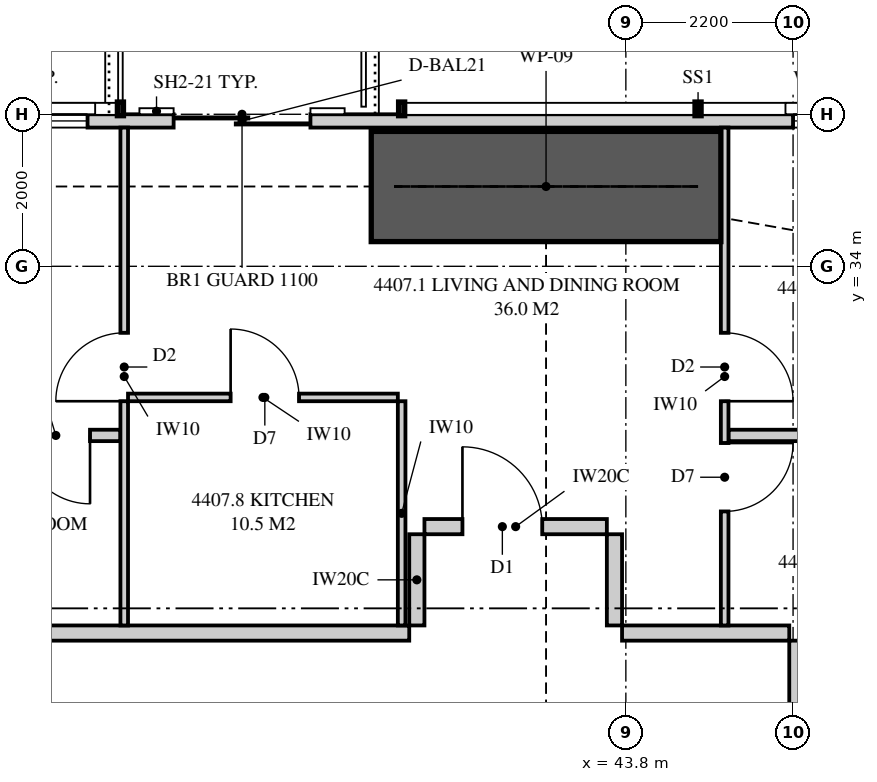
"""IFC4 building model, lengths in metres.
Left out: names, types, materials, properties, quantities, classifications, styles, units other than length and angle.
Written with IfcOpenShell. Run it as: python <this file> out.ifc"""

import sys

from ifc_helpers import new_model, si_unit, direction, frame, frame_2d, origin, place, context, subcontext, project, spatial, polyline, rectangle, outline, extrude, element, fill, save


model = new_model("IFC4")
c1 = context("Model", 3, precision=1e-05, world=origin(), true_north=direction((0.0, 1.0)))
c2 = subcontext(c1, "Body", "Model", "MODEL_VIEW")
j1 = project(units=[si_unit("LENGTHUNIT", "METRE"), si_unit("PLANEANGLEUNIT", "RADIAN")], contexts=[c1])
p1 = place(None, origin())
s1 = spatial("IfcSite", under=j1, at=p1, CompositionType="ELEMENT")
p2 = place(p1, origin())
s2 = spatial("IfcBuilding", under=s1, at=p2, CompositionType="ELEMENT")
p3 = place(p2, frame((0.0, 0.0, 164.4)))
s3 = spatial("IfcBuildingStorey", under=s2, at=p3, CompositionType="ELEMENT", Elevation=164.4)
p4 = place(p3, frame((49.949, 35.913, 0.0), z_axis=(0.0, 0.0, 1.0), x_axis=(-1.0, 0.0, 0.0)))
e1 = element("IfcWall", 1, at=p4, inside=s3, PredefinedType="SOLIDWALL", context=c2, shape_type="SweptSolid", body=[
    extrude(outline(polyline([(0.0, 0.0), (34.897, 0.0), (34.897, 3.11), (27.91, 3.11), (27.91, 2.15), (27.836, 2.15), (27.836, 3.11), (27.699, 3.11), (27.699, 2.15), (7.199, 2.15), (7.199, 3.11), (7.062, 3.11), (7.062, 2.15), (6.987, 2.15), (6.987, 3.11), (0.0, 3.11), (0.0, 0.0)])), frame((0.0, 0.087, 0.0), z_axis=(0.0, -1.0, 0.0), x_axis=(1.0, 0.0, 0.0)), (0.0, 0.0, 1.0), 0.175),
])
p5 = place(p4, frame((2.149, 0.0, 0.4)))
e2 = element("IfcOpeningElement", 2, at=p5, cuts=e1, PredefinedType="OPENING", context=c2, shape_type="SweptSolid", body=[
    extrude(rectangle(XDim=1.8, YDim=1.7, at=frame_2d((0.9, 0.85))), frame((0.0, 0.097, 0.0), z_axis=(0.0, -1.0, 0.0), x_axis=(1.0, 0.0, 0.0)), (0.0, 0.0, 1.0), 0.195),
])
p6 = place(p4, frame((10.299, 0.0, 0.0)))
e3 = element("IfcOpeningElement", 3, at=p6, cuts=e1, PredefinedType="OPENING", context=c2, shape_type="SweptSolid", body=[
    extrude(rectangle(XDim=1.8, YDim=2.1, at=frame_2d((0.9, 1.05))), frame((0.0, 0.097, 0.0), z_axis=(0.0, -1.0, 0.0), x_axis=(1.0, 0.0, 0.0)), (0.0, 0.0, 1.0), 0.195),
])
p7 = place(p4, frame((13.231, 0.0, 0.4)))
e4 = element("IfcOpeningElement", 4, at=p7, cuts=e1, PredefinedType="OPENING", context=c2, shape_type="SweptSolid", body=[
    extrude(rectangle(XDim=1.8, YDim=1.7, at=frame_2d((0.9, 0.85))), frame((0.0, 0.097, 0.0), z_axis=(0.0, -1.0, 0.0), x_axis=(1.0, 0.0, 0.0)), (0.0, 0.0, 1.0), 0.195),
])
p8 = place(p4, frame((22.699, 0.0, 0.0)))
e5 = element("IfcOpeningElement", 5, at=p8, cuts=e1, PredefinedType="OPENING", context=c2, shape_type="SweptSolid", body=[
    extrude(rectangle(XDim=1.8, YDim=2.1, at=frame_2d((0.9, 1.05))), frame((0.0, 0.097, 0.0), z_axis=(0.0, -1.0, 0.0), x_axis=(1.0, 0.0, 0.0)), (0.0, 0.0, 1.0), 0.195),
])
p9 = place(p4, frame((19.853, 0.0, 0.4)))
e6 = element("IfcOpeningElement", 6, at=p9, cuts=e1, PredefinedType="OPENING", context=c2, shape_type="SweptSolid", body=[
    extrude(rectangle(XDim=2.4, YDim=1.7, at=frame_2d((1.2, 0.85))), frame((0.0, 0.097, 0.0), z_axis=(0.0, -1.0, 0.0), x_axis=(1.0, 0.0, 0.0)), (0.0, 0.0, 1.0), 0.195),
])
p10 = place(p4, frame((30.104, 0.0, 0.4)))
e7 = element("IfcOpeningElement", 7, at=p10, cuts=e1, PredefinedType="OPENING", context=c2, shape_type="SweptSolid", body=[
    extrude(rectangle(XDim=2.4, YDim=1.7, at=frame_2d((1.2, 0.85))), frame((0.0, 0.097, 0.0), z_axis=(0.0, -1.0, 0.0), x_axis=(1.0, 0.0, 0.0)), (0.0, 0.0, 1.0), 0.195),
])
p11 = place(p3, frame((31.4, 29.175, 0.0), z_axis=(0.0, 0.0, 1.0), x_axis=(1.0, 0.0, 0.0)))
e8 = element("IfcWall", 8, at=p11, inside=s3, PredefinedType="PARTITIONING", context=c2, shape_type="SweptSolid", body=[
    extrude(outline(polyline([(0.0, 0.0), (9.55, 0.0), (9.55, 3.11), (1.437, 3.11), (1.437, 2.541), (0.763, 2.541), (0.763, 3.11), (0.0, 3.11), (0.0, 0.0)])), frame((0.0, 0.1, 0.0), z_axis=(0.0, -1.0, 0.0), x_axis=(1.0, 0.0, 0.0)), (0.0, 0.0, 1.0), 0.2),
])
p12 = place(p3, frame((37.2, 35.825, 0.0), z_axis=(0.0, 0.0, 1.0), x_axis=(0.0, -1.0, 0.0)))
e9 = element("IfcWall", 9, at=p12, inside=s3, PredefinedType="PARTITIONING", context=c2, shape_type="SweptSolid", body=[
    extrude(outline(polyline([(0.0, 0.0), (6.55, 0.0), (6.55, 3.11), (1.635, 3.11), (1.635, 2.15), (0.0, 2.15), (0.0, 3.11), (0.0, 0.0)])), frame((0.0, 0.05, 0.0), z_axis=(0.0, -1.0, 0.0), x_axis=(1.0, 0.0, 0.0)), (0.0, 0.0, 1.0), 0.1),
])
p13 = place(p12, frame((2.7, 0.0, 0.0)))
e10 = element("IfcOpeningElement", 10, at=p13, cuts=e9, PredefinedType="OPENING", context=c2, shape_type="SweptSolid", body=[
    extrude(rectangle(XDim=0.9, YDim=2.1, at=frame_2d((0.45, 1.05))), frame((0.0, 0.06, 0.0), z_axis=(0.0, -1.0, 0.0), x_axis=(1.0, 0.0, 0.0)), (0.0, 0.0, 1.0), 0.12),
])
p14 = place(p3, frame((45.1, 35.825, 0.0), z_axis=(0.0, 0.0, 1.0), x_axis=(0.0, -1.0, 0.0)))
e11 = element("IfcWall", 11, at=p14, inside=s3, PredefinedType="PARTITIONING", context=c2, shape_type="SweptSolid", body=[
    extrude(outline(polyline([(0.0, 0.0), (6.55, 0.0), (6.55, 3.11), (2.064, 3.11), (2.064, 2.15), (0.318, 2.15), (0.318, 3.11), (0.0, 3.11), (0.0, 0.0)])), frame((0.0, 0.05, 0.0), z_axis=(0.0, -1.0, 0.0), x_axis=(1.0, 0.0, 0.0)), (0.0, 0.0, 1.0), 0.1),
])
p15 = place(p14, frame((2.7, 0.0, 0.0)))
e12 = element("IfcOpeningElement", 12, at=p15, cuts=e11, PredefinedType="OPENING", context=c2, shape_type="SweptSolid", body=[
    extrude(rectangle(XDim=0.9, YDim=2.1, at=frame_2d((0.45, 1.05))), frame((0.0, 0.06, 0.0), z_axis=(0.0, -1.0, 0.0), x_axis=(1.0, 0.0, 0.0)), (0.0, 0.0, 1.0), 0.12),
])
p16 = place(p14, frame((4.15, 0.0, 0.0)))
e13 = element("IfcOpeningElement", 13, at=p16, cuts=e11, PredefinedType="OPENING", context=c2, shape_type="SweptSolid", body=[
    extrude(rectangle(XDim=0.9, YDim=2.1, at=frame_2d((0.45, 1.05))), frame((0.0, 0.06, 0.0), z_axis=(0.0, -1.0, 0.0), x_axis=(1.0, 0.0, 0.0)), (0.0, 0.0, 1.0), 0.12),
])
p17 = place(p3, frame((31.4, 31.775, 0.0), z_axis=(0.0, 0.0, 1.0), x_axis=(1.0, 0.0, 0.0)))
e14 = element("IfcWall", 14, at=p17, inside=s3, PredefinedType="PLUMBINGWALL", context=c2, shape_type="SweptSolid", body=[
    extrude(outline(polyline([(0.0, 0.0), (5.75, 0.0), (5.75, 3.11), (1.412, 3.11), (1.412, 2.541), (0.788, 2.541), (0.788, 3.11), (0.0, 3.11), (0.0, 0.0)])), frame((0.0, 0.075, 0.0), z_axis=(0.0, -1.0, 0.0), x_axis=(1.0, 0.0, 0.0)), (0.0, 0.0, 1.0), 0.15),
])
p18 = place(p17, frame((4.45, 0.0, 0.0)))
e15 = element("IfcOpeningElement", 15, at=p18, cuts=e14, PredefinedType="OPENING", context=c2, shape_type="SweptSolid", body=[
    extrude(rectangle(XDim=0.9, YDim=2.1, at=frame_2d((0.45, 1.05))), frame((0.0, 0.085, 0.0), z_axis=(0.0, -1.0, 0.0), x_axis=(1.0, 0.0, 0.0)), (0.0, 0.0, 1.0), 0.17),
])
p19 = place(p3, frame((45.15, 31.775, 0.0), z_axis=(0.0, 0.0, 1.0), x_axis=(1.0, 0.0, 0.0)))
e16 = element("IfcWall", 16, at=p19, inside=s3, PredefinedType="PLUMBINGWALL", context=c2, shape_type="SweptSolid", body=[
    extrude(rectangle(XDim=3.5, YDim=0.15, at=frame_2d((1.75, 0.0))), origin(), (0.0, 0.0, 1.0), 3.11),
])
p20 = place(p3, frame((37.25, 32.275, 0.0), z_axis=(0.0, 0.0, 1.0), x_axis=(1.0, 0.0, 0.0)))
e17 = element("IfcWall", 17, at=p20, inside=s3, PredefinedType="PARTITIONING", context=c2, shape_type="SweptSolid", body=[
    extrude(rectangle(XDim=3.55, YDim=0.1, at=frame_2d((1.775, 0.0))), origin(), (0.0, 0.0, 1.0), 3.11),
])
p21 = place(p20, frame((1.35, 0.0, 0.0)))
e18 = element("IfcOpeningElement", 18, at=p21, cuts=e17, PredefinedType="OPENING", context=c2, shape_type="SweptSolid", body=[
    extrude(rectangle(XDim=0.9, YDim=2.1, at=frame_2d((0.45, 1.05))), frame((0.0, 0.06, 0.0), z_axis=(0.0, -1.0, 0.0), x_axis=(1.0, 0.0, 0.0)), (0.0, 0.0, 1.0), 0.12),
])
p22 = place(p3, frame((40.85, 32.225, 0.0), z_axis=(0.0, 0.0, 1.0), x_axis=(0.0, -1.0, 0.0)))
e19 = element("IfcWall", 19, at=p22, inside=s3, PredefinedType="PARTITIONING", context=c2, shape_type="SweptSolid", body=[
    extrude(rectangle(XDim=2.95, YDim=0.1, at=frame_2d((1.475, 0.0))), origin(), (0.0, 0.0, 1.0), 3.11),
])
p23 = place(p3, frame((46.05, 21.75, 0.0), z_axis=(0.0, 0.0, 1.0), x_axis=(0.0, 1.0, 0.0)))
e20 = element("IfcWall", 20, at=p23, inside=s3, PredefinedType="PARTITIONING", context=c2, shape_type="SweptSolid", body=[
    extrude(outline(polyline([(0.0, 0.0), (7.325, 0.0), (7.325, 3.11), (3.587, 3.11), (3.587, 2.541), (2.913, 2.541), (2.913, 3.11), (0.0, 3.11), (0.0, 0.0)])), frame((0.0, 0.1, 0.0), z_axis=(0.0, -1.0, 0.0), x_axis=(1.0, 0.0, 0.0)), (0.0, 0.0, 1.0), 0.2),
])
p24 = place(p23, frame((3.163, 0.0, 0.0)))
e21 = element("IfcOpeningElement", 21, at=p24, cuts=e20, PredefinedType="OPENING", context=c2, shape_type="SweptSolid", body=[
    extrude(rectangle(XDim=1.05, YDim=2.2, at=frame_2d((0.525, 1.1))), frame((0.0, 0.11, 0.0), z_axis=(0.0, -1.0, 0.0), x_axis=(1.0, 0.0, 0.0)), (0.0, 0.0, 1.0), 0.22),
])
p25 = place(p3, frame((43.75, 29.175, 0.0), z_axis=(0.0, 0.0, 1.0), x_axis=(1.0, 0.0, 0.0)))
e22 = element("IfcWall", 22, at=p25, inside=s3, PredefinedType="PARTITIONING", context=c2, shape_type="SweptSolid", body=[
    extrude(rectangle(XDim=2.2, YDim=0.2, at=frame_2d((1.1, 0.0))), origin(), (0.0, 0.0, 1.0), 3.11),
])
p26 = place(p3, frame((41.15, 30.575, 0.0), z_axis=(0.0, 0.0, 1.0), x_axis=(1.0, 0.0, 0.0)))
e23 = element("IfcWall", 23, at=p26, inside=s3, PredefinedType="PARTITIONING", context=c2, shape_type="SweptSolid", body=[
    extrude(outline(polyline([(0.0, 0.0), (2.4, 0.0), (2.4, 3.11), (1.938, 3.11), (1.938, 2.541), (1.263, 2.541), (1.263, 3.11), (0.0, 3.11), (0.0, 0.0)])), frame((0.0, 0.1, 0.0), z_axis=(0.0, -1.0, 0.0), x_axis=(1.0, 0.0, 0.0)), (0.0, 0.0, 1.0), 0.2),
])
p27 = place(p26, frame((0.5, 0.0, 0.0)))
e24 = element("IfcOpeningElement", 24, at=p27, cuts=e23, PredefinedType="OPENING", context=c2, shape_type="SweptSolid", body=[
    extrude(rectangle(XDim=1.05, YDim=2.2, at=frame_2d((0.525, 1.1))), frame((0.0, 0.11, 0.0), z_axis=(0.0, -1.0, 0.0), x_axis=(1.0, 0.0, 0.0)), (0.0, 0.0, 1.0), 0.22),
])
for number, where, z_axis, x_axis in (
    (25, (41.05, 29.275, 0.0), (0.0, 0.0, 1.0), (0.0, 1.0, 0.0)),
    (26, (43.65, 29.275, 0.0), (0.0, 0.0, 1.0), (0.0, 1.0, 0.0)),
):
    element("IfcWall", number, at=place(p3, frame(where, z_axis=z_axis, x_axis=x_axis)), inside=s3, PredefinedType="PARTITIONING", context=c2, shape_type="SweptSolid", body=[
        extrude(rectangle(XDim=1.2, YDim=0.2, at=frame_2d((0.6, 0.0))), origin(), (0.0, 0.0, 1.0), 3.11),
    ])
p28 = place(p3, frame((40.45, 35.05, 0.0), z_axis=(0.0, 0.0, 1.0), x_axis=(1.0, 0.0, 0.0)))
e27 = element("IfcWall", 27, at=p28, inside=s3, PredefinedType="SHEAR", context=c2, shape_type="SweptSolid", body=[
    extrude(rectangle(XDim=4.6, YDim=1.45, at=frame_2d((2.3, 0.0))), origin(), (0.0, 0.0, 1.0), 3.35),
])
p29 = place(p5, origin())
e28 = element("IfcWindow", 28, at=p29, inside=s3, PartitioningType="SINGLE_PANEL", PredefinedType="WINDOW", context=c2, shape_type="SweptSolid", body=[
    extrude(rectangle(XDim=1.8, YDim=1.7, at=frame_2d((0.9, 0.85))), frame((0.0, 0.03, 0.0), z_axis=(0.0, -1.0, 0.0), x_axis=(1.0, 0.0, 0.0)), (0.0, 0.0, 1.0), 0.06),
])
fill(e2, e28)
p30 = place(p6, origin())
e29 = element("IfcDoor", 29, at=p30, inside=s3, OperationType="SLIDING_TO_LEFT", PredefinedType="DOOR", context=c2, shape_type="SweptSolid", body=[
    extrude(rectangle(XDim=1.8, YDim=2.1, at=frame_2d((0.9, 1.05))), frame((0.0, 0.025, 0.0), z_axis=(0.0, -1.0, 0.0), x_axis=(1.0, 0.0, 0.0)), (0.0, 0.0, 1.0), 0.05),
])
fill(e3, e29)
p31 = place(p7, origin())
e30 = element("IfcWindow", 30, at=p31, inside=s3, PartitioningType="SINGLE_PANEL", PredefinedType="WINDOW", context=c2, shape_type="SweptSolid", body=[
    extrude(rectangle(XDim=1.8, YDim=1.7, at=frame_2d((0.9, 0.85))), frame((0.0, 0.03, 0.0), z_axis=(0.0, -1.0, 0.0), x_axis=(1.0, 0.0, 0.0)), (0.0, 0.0, 1.0), 0.06),
])
fill(e4, e30)
p32 = place(p27, origin())
e31 = element("IfcDoor", 31, at=p32, inside=s3, OperationType="SINGLE_SWING_LEFT", PredefinedType="DOOR", context=c2, shape_type="SweptSolid", body=[
    extrude(rectangle(XDim=1.05, YDim=2.2, at=frame_2d((0.525, 1.1))), frame((0.0, 0.025, 0.0), z_axis=(0.0, -1.0, 0.0), x_axis=(1.0, 0.0, 0.0)), (0.0, 0.0, 1.0), 0.05),
])
fill(e24, e31)
p33 = place(p13, frame((0.9, 0.0, 0.0), z_axis=(0.0, 0.0, 1.0), x_axis=(-1.0, 0.0, 0.0)))
e32 = element("IfcDoor", 32, at=p33, inside=s3, OperationType="SINGLE_SWING_LEFT", PredefinedType="DOOR", context=c2, shape_type="SweptSolid", body=[
    extrude(rectangle(XDim=0.9, YDim=2.1, at=frame_2d((0.45, 1.05))), frame((0.0, 0.025, 0.0), z_axis=(0.0, -1.0, 0.0), x_axis=(1.0, 0.0, 0.0)), (0.0, 0.0, 1.0), 0.05),
])
fill(e10, e32)
p34 = place(p18, frame((0.9, 0.0, 0.0), z_axis=(0.0, 0.0, 1.0), x_axis=(-1.0, 0.0, 0.0)))
e33 = element("IfcDoor", 33, at=p34, inside=s3, OperationType="SINGLE_SWING_LEFT", PredefinedType="DOOR", context=c2, shape_type="SweptSolid", body=[
    extrude(rectangle(XDim=0.9, YDim=2.1, at=frame_2d((0.45, 1.05))), frame((0.0, 0.025, 0.0), z_axis=(0.0, -1.0, 0.0), x_axis=(1.0, 0.0, 0.0)), (0.0, 0.0, 1.0), 0.05),
])
fill(e15, e33)
p35 = place(p15, origin())
e34 = element("IfcDoor", 34, at=p35, inside=s3, OperationType="SINGLE_SWING_RIGHT", PredefinedType="DOOR", context=c2, shape_type="SweptSolid", body=[
    extrude(rectangle(XDim=0.9, YDim=2.1, at=frame_2d((0.45, 1.05))), frame((0.0, 0.025, 0.0), z_axis=(0.0, -1.0, 0.0), x_axis=(1.0, 0.0, 0.0)), (0.0, 0.0, 1.0), 0.05),
])
fill(e12, e34)
p36 = place(p16, origin())
e35 = element("IfcDoor", 35, at=p36, inside=s3, OperationType="SINGLE_SWING_LEFT", PredefinedType="DOOR", context=c2, shape_type="SweptSolid", body=[
    extrude(rectangle(XDim=0.9, YDim=2.1, at=frame_2d((0.45, 1.05))), frame((0.0, 0.025, 0.0), z_axis=(0.0, -1.0, 0.0), x_axis=(1.0, 0.0, 0.0)), (0.0, 0.0, 1.0), 0.05),
])
fill(e13, e35)
p37 = place(p21, origin())
e36 = element("IfcDoor", 36, at=p37, inside=s3, OperationType="SINGLE_SWING_LEFT", PredefinedType="DOOR", context=c2, shape_type="SweptSolid", body=[
    extrude(rectangle(XDim=0.9, YDim=2.1, at=frame_2d((0.45, 1.05))), frame((0.0, 0.025, 0.0), z_axis=(0.0, -1.0, 0.0), x_axis=(1.0, 0.0, 0.0)), (0.0, 0.0, 1.0), 0.05),
])
fill(e18, e36)
save(model, sys.argv[1])
